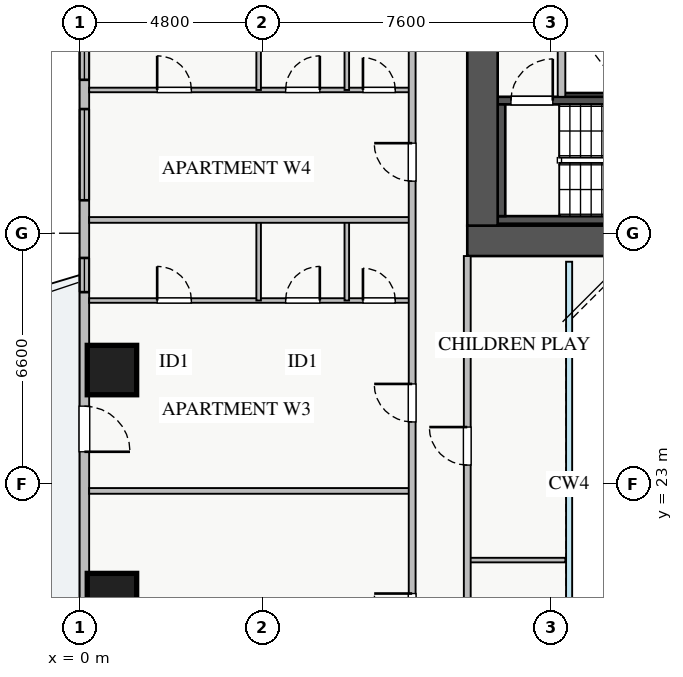
"""IFC4 building model, lengths in metres.
Left out: names, types, materials, properties, quantities, classifications, styles, units other than length and angle.
Written with IfcOpenShell. Run it as: python <this file> out.ifc"""

import sys

from ifc_helpers import new_model, si_unit, direction, frame, frame_2d, origin, origin_2d, place, context, subcontext, project, spatial, rectangle, extrude, source, transform, mapped, element, fill, save


model = new_model("IFC4")
c1 = context("Model", 3, precision=1e-05, world=origin(), true_north=direction((0.0, 1.0)))
c2 = subcontext(c1, "Body", "Model", "MODEL_VIEW")
j1 = project(units=[si_unit("LENGTHUNIT", "METRE"), si_unit("PLANEANGLEUNIT", "RADIAN")], contexts=[c1])
p1 = place(None, origin())
s1 = spatial("IfcSite", under=j1, at=p1, CompositionType="ELEMENT")
p2 = place(p1, origin())
s2 = spatial("IfcBuilding", under=s1, at=p2, CompositionType="ELEMENT")
p3 = place(p2, frame((0.0, 0.0, 66.5)))
s3 = spatial("IfcBuildingStorey", under=s2, at=p3, CompositionType="ELEMENT", Elevation=66.5)
p4 = place(p3, frame((12.68, 33.2, 0.0), z_axis=(0.0, 0.0, 1.0), x_axis=(1.0, 0.0, 0.0)))
e1 = element("IfcWall", 1, at=p4, inside=s3, PredefinedType="SHEAR", context=c2, shape_type="SweptSolid", body=[
    extrude(rectangle(XDim=1.94, YDim=0.18, at=frame_2d((0.97, 0.0))), origin(), (0.0, 0.0, 1.0), 3.07),
])
p5 = place(p3, frame((11.0, 29.95, 0.0), z_axis=(0.0, 0.0, 1.0), x_axis=(1.0, 0.0, 0.0)))
e2 = element("IfcWall", 2, at=p5, inside=s3, PredefinedType="SHEAR", context=c2, shape_type="SweptSolid", body=[
    extrude(rectangle(XDim=7.15, YDim=0.2, at=frame_2d((3.575, 0.0))), origin(), (0.0, 0.0, 1.0), 3.25),
])
p6 = place(p3, frame((11.0, 33.09, 0.0), z_axis=(0.0, 0.0, 1.0), x_axis=(1.0, 0.0, 0.0)))
e3 = element("IfcWall", 3, at=p6, inside=s3, PredefinedType="SHEAR", context=c2, shape_type="SweptSolid", body=[
    extrude(rectangle(XDim=7.15, YDim=0.2, at=frame_2d((3.575, 0.0))), origin(), (0.0, 0.0, 1.0), 3.25),
])
p7 = place(p6, frame((0.35, 0.0, 0.0)))
e4 = element("IfcOpeningElement", 4, at=p7, cuts=e3, PredefinedType="OPENING", context=c2, shape_type="SweptSolid", body=[
    extrude(rectangle(XDim=1.1, YDim=2.05, at=frame_2d((0.55, 1.025))), frame((0.0, 0.11, 0.0), z_axis=(0.0, -1.0, 0.0), x_axis=(1.0, 0.0, 0.0)), (0.0, 0.0, 1.0), 0.22),
])
p8 = place(p3, frame((11.1, 30.05, 0.0), z_axis=(0.0, 0.0, 1.0), x_axis=(0.0, 1.0, 0.0)))
e5 = element("IfcWall", 5, at=p8, inside=s3, PredefinedType="SHEAR", context=c2, shape_type="SweptSolid", body=[
    extrude(rectangle(XDim=2.94, YDim=0.2, at=frame_2d((1.47, 0.0))), origin(), (0.0, 0.0, 1.0), 3.25),
])
p9 = place(p3, frame((10.2, 29.4, 0.0), z_axis=(0.0, 0.0, 1.0), x_axis=(1.0, 0.0, 0.0)))
e6 = element("IfcWall", 6, at=p9, inside=s3, PredefinedType="SHEAR", context=c2, shape_type="SweptSolid", body=[
    extrude(rectangle(XDim=17.6, YDim=0.8, at=frame_2d((8.8, 0.0))), origin(), (0.0, 0.0, 1.0), 3.25),
])
p10 = place(p3, frame((10.6, 29.8, 0.0), z_axis=(0.0, 0.0, 1.0), x_axis=(0.0, 1.0, 0.0)))
e7 = element("IfcWall", 7, at=p10, inside=s3, PredefinedType="SHEAR", context=c2, shape_type="SweptSolid", body=[
    extrude(rectangle(XDim=5.6, YDim=0.8, at=frame_2d((2.8, 0.0))), origin(), (0.0, 0.0, 1.0), 3.25),
])
m1 = source(origin(), c2, "Body", "SweptSolid", [
    extrude(rectangle(XDim=1.3, YDim=1.3, at=origin_2d()), origin(), (0.0, 0.0, 1.0), 3.25),
])
for number, where, z_axis, x_axis in (
    (8, (0.85, 26.0, 0.0), (0.0, 0.0, 1.0), (1.0, 0.0, 0.0)),
    (9, (0.85, 20.0, 0.0), (0.0, 0.0, 1.0), (1.0, 0.0, 0.0)),
):
    element("IfcColumn", number, at=place(p3, frame(where, z_axis=z_axis, x_axis=x_axis)), inside=s3, PredefinedType="COLUMN", context=c2, shape_type="MappedRepresentation", body=[
        mapped(m1, transform((0.0, 0.0, 0.0), x_axis=(1.0, 0.0, 0.0), y_axis=(0.0, 1.0, 0.0), z_axis=(0.0, 0.0, 1.0), scale=1.0)),
    ])
p11 = place(p3, frame((0.125, 9.45, 0.0), z_axis=(0.0, 0.0, 1.0), x_axis=(0.0, 1.0, 0.0)))
e10 = element("IfcWall", 10, at=p11, inside=s3, PredefinedType="STANDARD", context=c2, shape_type="SweptSolid", body=[
    extrude(rectangle(XDim=27.1, YDim=0.25, at=frame_2d((13.55, 0.0))), origin(), (0.0, 0.0, 1.0), 2.61),
])
p12 = place(p11, frame((14.4, 0.0, 0.0)))
e11 = element("IfcOpeningElement", 11, at=p12, cuts=e10, PredefinedType="OPENING", context=c2, shape_type="SweptSolid", body=[
    extrude(rectangle(XDim=1.2, YDim=2.1, at=frame_2d((0.6, 1.05))), frame((0.0, 0.135, 0.0), z_axis=(0.0, -1.0, 0.0), x_axis=(1.0, 0.0, 0.0)), (0.0, 0.0, 1.0), 0.27),
])
p13 = place(p11, frame((1.417, 0.0, 0.9)))
e12 = element("IfcOpeningElement", 12, at=p13, cuts=e10, PredefinedType="OPENING", context=c2, shape_type="SweptSolid", body=[
    extrude(rectangle(XDim=1.2, YDim=1.4, at=frame_2d((0.6, 0.7))), frame((0.0, 0.135, 0.0), z_axis=(0.0, -1.0, 0.0), x_axis=(1.0, 0.0, 0.0)), (0.0, 0.0, 1.0), 0.27),
])
p14 = place(p11, frame((24.188, 0.0, 0.9)))
e13 = element("IfcOpeningElement", 13, at=p14, cuts=e10, PredefinedType="OPENING", context=c2, shape_type="SweptSolid", body=[
    extrude(rectangle(XDim=1.5, YDim=1.5, at=frame_2d((0.75, 0.75))), frame((0.0, 0.135, 0.0), z_axis=(0.0, -1.0, 0.0), x_axis=(1.0, 0.0, 0.0)), (0.0, 0.0, 1.0), 0.27),
])
p15 = place(p11, frame((3.722, 0.0, 0.9)))
e14 = element("IfcOpeningElement", 14, at=p15, cuts=e10, PredefinedType="OPENING", context=c2, shape_type="SweptSolid", body=[
    extrude(rectangle(XDim=2.4, YDim=1.5, at=frame_2d((1.2, 0.75))), frame((0.0, 0.135, 0.0), z_axis=(0.0, -1.0, 0.0), x_axis=(1.0, 0.0, 0.0)), (0.0, 0.0, 1.0), 0.27),
])
p16 = place(p11, frame((21.018, 0.0, 0.9)))
e15 = element("IfcOpeningElement", 15, at=p16, cuts=e10, PredefinedType="OPENING", context=c2, shape_type="SweptSolid", body=[
    extrude(rectangle(XDim=2.4, YDim=1.5, at=frame_2d((1.2, 0.75))), frame((0.0, 0.135, 0.0), z_axis=(0.0, -1.0, 0.0), x_axis=(1.0, 0.0, 0.0)), (0.0, 0.0, 1.0), 0.27),
])
p17 = place(p11, frame((18.6, 0.0, 0.9)))
e16 = element("IfcOpeningElement", 16, at=p17, cuts=e10, PredefinedType="OPENING", context=c2, shape_type="SweptSolid", body=[
    extrude(rectangle(XDim=0.9, YDim=1.2, at=frame_2d((0.45, 0.6))), frame((0.0, 0.135, 0.0), z_axis=(0.0, -1.0, 0.0), x_axis=(1.0, 0.0, 0.0)), (0.0, 0.0, 1.0), 0.27),
])
p18 = place(p3, frame((12.68, 33.19, 0.0), z_axis=(0.0, 0.0, 1.0), x_axis=(0.0, 1.0, 0.0)))
e17 = element("IfcWall", 17, at=p18, inside=s3, PredefinedType="PARTITIONING", context=c2, shape_type="SweptSolid", body=[
    extrude(rectangle(XDim=2.21, YDim=0.2, at=frame_2d((1.105, 0.0))), origin(), (0.0, 0.0, 1.0), 3.07),
])
p19 = place(p3, frame((0.25, 27.83, 0.0), z_axis=(0.0, 0.0, 1.0), x_axis=(1.0, 0.0, 0.0)))
e18 = element("IfcWall", 18, at=p19, inside=s3, PredefinedType="PLUMBINGWALL", context=c2, shape_type="SweptSolid", body=[
    extrude(rectangle(XDim=8.5, YDim=0.12, at=frame_2d((4.25, 0.0))), origin(), (0.0, 0.0, 1.0), 2.815),
])
p20 = place(p19, frame((1.79, 0.0, 0.0)))
e19 = element("IfcOpeningElement", 19, at=p20, cuts=e18, PredefinedType="OPENING", context=c2, shape_type="SweptSolid", body=[
    extrude(rectangle(XDim=0.9, YDim=2.05, at=frame_2d((0.45, 1.025))), frame((0.0, 0.07, 0.0), z_axis=(0.0, -1.0, 0.0), x_axis=(1.0, 0.0, 0.0)), (0.0, 0.0, 1.0), 0.14),
])
p21 = place(p19, frame((5.17, 0.0, 0.0)))
e20 = element("IfcOpeningElement", 20, at=p21, cuts=e18, PredefinedType="OPENING", context=c2, shape_type="SweptSolid", body=[
    extrude(rectangle(XDim=0.9, YDim=2.05, at=frame_2d((0.45, 1.025))), frame((0.0, 0.07, 0.0), z_axis=(0.0, -1.0, 0.0), x_axis=(1.0, 0.0, 0.0)), (0.0, 0.0, 1.0), 0.14),
])
p22 = place(p19, frame((7.205, 0.0, 0.0)))
e21 = element("IfcOpeningElement", 21, at=p22, cuts=e18, PredefinedType="OPENING", context=c2, shape_type="SweptSolid", body=[
    extrude(rectangle(XDim=0.85, YDim=2.05, at=frame_2d((0.425, 1.025))), frame((0.0, 0.07, 0.0), z_axis=(0.0, -1.0, 0.0), x_axis=(1.0, 0.0, 0.0)), (0.0, 0.0, 1.0), 0.14),
])
for number, where, z_axis, x_axis in (
    (22, (4.71, 27.83, 0.0), (0.0, 0.0, 1.0), (0.0, 1.0, 0.0)),
    (23, (7.03, 27.83, 0.0), (0.0, 0.0, 1.0), (0.0, 1.0, 0.0)),
):
    element("IfcWall", number, at=place(p3, frame(where, z_axis=z_axis, x_axis=x_axis)), inside=s3, PredefinedType="PLUMBINGWALL", context=c2, shape_type="SweptSolid", body=[
        extrude(rectangle(XDim=2.12, YDim=0.12, at=frame_2d((1.06, 0.0))), origin(), (0.0, 0.0, 1.0), 3.07),
    ])
p23 = place(p3, frame((0.25, 22.82, 0.0), z_axis=(0.0, 0.0, 1.0), x_axis=(1.0, 0.0, 0.0)))
e24 = element("IfcWall", 24, at=p23, inside=s3, PredefinedType="PARTITIONING", context=c2, shape_type="SweptSolid", body=[
    extrude(rectangle(XDim=8.5, YDim=0.15, at=frame_2d((4.25, 0.0))), origin(), (0.0, 0.0, 1.0), 3.07),
])
p24 = place(p3, frame((0.25, 33.37, 0.0), z_axis=(0.0, 0.0, 1.0), x_axis=(1.0, 0.0, 0.0)))
e25 = element("IfcWall", 25, at=p24, inside=s3, PredefinedType="PLUMBINGWALL", context=c2, shape_type="SweptSolid", body=[
    extrude(rectangle(XDim=8.5, YDim=0.12, at=frame_2d((4.25, 0.0))), origin(), (0.0, 0.0, 1.0), 3.07),
])
p25 = place(p24, frame((1.79, 0.0, 0.0)))
e26 = element("IfcOpeningElement", 26, at=p25, cuts=e25, PredefinedType="OPENING", context=c2, shape_type="SweptSolid", body=[
    extrude(rectangle(XDim=0.9, YDim=2.05, at=frame_2d((0.45, 1.025))), frame((0.0, 0.07, 0.0), z_axis=(0.0, -1.0, 0.0), x_axis=(1.0, 0.0, 0.0)), (0.0, 0.0, 1.0), 0.14),
])
p26 = place(p24, frame((5.17, 0.0, 0.0)))
e27 = element("IfcOpeningElement", 27, at=p26, cuts=e25, PredefinedType="OPENING", context=c2, shape_type="SweptSolid", body=[
    extrude(rectangle(XDim=0.9, YDim=2.05, at=frame_2d((0.45, 1.025))), frame((0.0, 0.07, 0.0), z_axis=(0.0, -1.0, 0.0), x_axis=(1.0, 0.0, 0.0)), (0.0, 0.0, 1.0), 0.14),
])
p27 = place(p24, frame((7.205, 0.0, 0.0)))
e28 = element("IfcOpeningElement", 28, at=p27, cuts=e25, PredefinedType="OPENING", context=c2, shape_type="SweptSolid", body=[
    extrude(rectangle(XDim=0.85, YDim=2.05, at=frame_2d((0.425, 1.025))), frame((0.0, 0.07, 0.0), z_axis=(0.0, -1.0, 0.0), x_axis=(1.0, 0.0, 0.0)), (0.0, 0.0, 1.0), 0.14),
])
for number, where, z_axis, x_axis in (
    (29, (4.71, 33.37, 0.0), (0.0, 0.0, 1.0), (0.0, 1.0, 0.0)),
    (30, (7.03, 33.37, 0.0), (0.0, 0.0, 1.0), (0.0, 1.0, 0.0)),
):
    element("IfcWall", number, at=place(p3, frame(where, z_axis=z_axis, x_axis=x_axis)), inside=s3, PredefinedType="PLUMBINGWALL", context=c2, shape_type="SweptSolid", body=[
        extrude(rectangle(XDim=3.71, YDim=0.12, at=frame_2d((1.855, 0.0))), origin(), (0.0, 0.0, 1.0), 3.07),
    ])
p28 = place(p3, frame((0.25, 29.95, 0.0), z_axis=(0.0, 0.0, 1.0), x_axis=(1.0, 0.0, 0.0)))
e31 = element("IfcWall", 31, at=p28, inside=s3, PredefinedType="PARTITIONING", context=c2, shape_type="SweptSolid", body=[
    extrude(rectangle(XDim=8.5, YDim=0.15, at=frame_2d((4.25, 0.0))), origin(), (0.0, 0.0, 1.0), 3.07),
])
p29 = place(p3, frame((8.75, 7.21, 0.0), z_axis=(0.0, 0.0, 1.0), x_axis=(0.0, 1.0, 0.0)))
e32 = element("IfcWall", 32, at=p29, inside=s3, PredefinedType="PARTITIONING", context=c2, shape_type="SweptSolid", body=[
    extrude(rectangle(XDim=31.23, YDim=0.18, at=frame_2d((15.615, 0.0))), origin(), (0.0, 0.0, 1.0), 3.07),
])
p30 = place(p29, frame((30.09, 0.0, 0.0)))
e33 = element("IfcOpeningElement", 33, at=p30, cuts=e32, PredefinedType="OPENING", context=c2, shape_type="SweptSolid", body=[
    extrude(rectangle(XDim=0.9, YDim=2.05, at=frame_2d((0.45, 1.025))), frame((0.0, 0.1, 0.0), z_axis=(0.0, -1.0, 0.0), x_axis=(1.0, 0.0, 0.0)), (0.0, 0.0, 1.0), 0.2),
])
p31 = place(p29, frame((0.24, 0.0, 0.0)))
e34 = element("IfcOpeningElement", 34, at=p31, cuts=e32, PredefinedType="OPENING", context=c2, shape_type="SweptSolid", body=[
    extrude(rectangle(XDim=0.9, YDim=2.05, at=frame_2d((0.45, 1.025))), frame((0.0, 0.1, 0.0), z_axis=(0.0, -1.0, 0.0), x_axis=(1.0, 0.0, 0.0)), (0.0, 0.0, 1.0), 0.2),
])
p32 = place(p29, frame((2.555, 0.0, 0.0)))
e35 = element("IfcOpeningElement", 35, at=p32, cuts=e32, PredefinedType="OPENING", context=c2, shape_type="SweptSolid", body=[
    extrude(rectangle(XDim=1.0, YDim=2.05, at=frame_2d((0.5, 1.025))), frame((0.0, 0.1, 0.0), z_axis=(0.0, -1.0, 0.0), x_axis=(1.0, 0.0, 0.0)), (0.0, 0.0, 1.0), 0.2),
])
p33 = place(p29, frame((11.91, 0.0, 0.0)))
e36 = element("IfcOpeningElement", 36, at=p33, cuts=e32, PredefinedType="OPENING", context=c2, shape_type="SweptSolid", body=[
    extrude(rectangle(XDim=1.0, YDim=2.05, at=frame_2d((0.5, 1.025))), frame((0.0, 0.1, 0.0), z_axis=(0.0, -1.0, 0.0), x_axis=(1.0, 0.0, 0.0)), (0.0, 0.0, 1.0), 0.2),
])
p34 = place(p29, frame((17.425, 0.0, 0.0)))
e37 = element("IfcOpeningElement", 37, at=p34, cuts=e32, PredefinedType="OPENING", context=c2, shape_type="SweptSolid", body=[
    extrude(rectangle(XDim=1.0, YDim=2.05, at=frame_2d((0.5, 1.025))), frame((0.0, 0.1, 0.0), z_axis=(0.0, -1.0, 0.0), x_axis=(1.0, 0.0, 0.0)), (0.0, 0.0, 1.0), 0.2),
])
p35 = place(p29, frame((23.76, 0.0, 0.0)))
e38 = element("IfcOpeningElement", 38, at=p35, cuts=e32, PredefinedType="OPENING", context=c2, shape_type="SweptSolid", body=[
    extrude(rectangle(XDim=1.0, YDim=2.05, at=frame_2d((0.5, 1.025))), frame((0.0, 0.1, 0.0), z_axis=(0.0, -1.0, 0.0), x_axis=(1.0, 0.0, 0.0)), (0.0, 0.0, 1.0), 0.2),
])
p36 = place(p3, frame((10.2, 21.0, 0.0), z_axis=(0.0, 0.0, 1.0), x_axis=(1.0, 0.0, 0.0)))
e39 = element("IfcWall", 39, at=p36, inside=s3, PredefinedType="PLUMBINGWALL", context=c2, shape_type="SweptSolid", body=[
    extrude(rectangle(XDim=2.58, YDim=0.12, at=frame_2d((1.29, 0.0))), origin(), (0.0, 0.0, 1.0), 3.07),
])
p37 = place(p3, frame((10.2, 17.0, 0.0), z_axis=(0.0, 0.0, 1.0), x_axis=(0.0, 1.0, 0.0)))
e40 = element("IfcWall", 40, at=p37, inside=s3, PredefinedType="PARTITIONING", context=c2, shape_type="SweptSolid", body=[
    extrude(rectangle(XDim=12.0, YDim=0.18, at=frame_2d((6.0, 0.0))), origin(), (0.0, 0.0, 1.0), 3.07),
])
p38 = place(p37, frame((1.5, 0.0, 0.0)))
e41 = element("IfcOpeningElement", 41, at=p38, cuts=e40, PredefinedType="OPENING", context=c2, shape_type="SweptSolid", body=[
    extrude(rectangle(XDim=0.85, YDim=2.05, at=frame_2d((0.425, 1.025))), frame((0.0, 0.1, 0.0), z_axis=(0.0, -1.0, 0.0), x_axis=(1.0, 0.0, 0.0)), (0.0, 0.0, 1.0), 0.2),
])
p39 = place(p37, frame((6.5, 0.0, 0.0)))
e42 = element("IfcOpeningElement", 42, at=p39, cuts=e40, PredefinedType="OPENING", context=c2, shape_type="SweptSolid", body=[
    extrude(rectangle(XDim=1.0, YDim=2.05, at=frame_2d((0.5, 1.025))), frame((0.0, 0.1, 0.0), z_axis=(0.0, -1.0, 0.0), x_axis=(1.0, 0.0, 0.0)), (0.0, 0.0, 1.0), 0.2),
])
m2 = source(origin(), c2, "Body", "SweptSolid", [
    extrude(rectangle(XDim=1.2, YDim=2.1, at=frame_2d((0.6, 1.05))), frame((0.0, 0.025, 0.0), z_axis=(0.0, -1.0, 0.0), x_axis=(1.0, 0.0, 0.0)), (0.0, 0.0, 1.0), 0.05),
])
p40 = place(p12, frame((1.2, 0.0, 0.0), z_axis=(0.0, 0.0, 1.0), x_axis=(-1.0, 0.0, 0.0)))
e43 = element("IfcDoor", 43, at=p40, inside=s3, OperationType="SINGLE_SWING_LEFT", PredefinedType="DOOR", context=c2, shape_type="MappedRepresentation", body=[
    mapped(m2, transform((0.0, 0.0, 0.0), x_axis=(1.0, 0.0, 0.0), y_axis=(0.0, 1.0, 0.0), z_axis=(0.0, 0.0, 1.0), scale=1.0)),
])
fill(e11, e43)
m3 = source(origin(), c2, "Body", "SweptSolid", [
    extrude(rectangle(XDim=1.5, YDim=1.5, at=frame_2d((0.75, 0.75))), frame((0.0, 0.03, 0.0), z_axis=(0.0, -1.0, 0.0), x_axis=(1.0, 0.0, 0.0)), (0.0, 0.0, 1.0), 0.06),
])
p41 = place(p14, origin())
e44 = element("IfcWindow", 44, at=p41, inside=s3, PartitioningType="TRIPLE_PANEL_VERTICAL", PredefinedType="WINDOW", context=c2, shape_type="MappedRepresentation", body=[
    mapped(m3, transform((0.0, 0.0, 0.0), x_axis=(1.0, 0.0, 0.0), y_axis=(0.0, 1.0, 0.0), z_axis=(0.0, 0.0, 1.0), scale=1.0)),
])
fill(e13, e44)
m4 = source(origin(), c2, "Body", "SweptSolid", [
    extrude(rectangle(XDim=1.1, YDim=2.05, at=frame_2d((0.55, 1.025))), frame((0.0, 0.025, 0.0), z_axis=(0.0, -1.0, 0.0), x_axis=(1.0, 0.0, 0.0)), (0.0, 0.0, 1.0), 0.05),
])
p42 = place(p7, origin())
e45 = element("IfcDoor", 45, at=p42, inside=s3, OperationType="SINGLE_SWING_RIGHT", PredefinedType="DOOR", context=c2, shape_type="MappedRepresentation", body=[
    mapped(m4, transform((0.0, 0.0, 0.0), x_axis=(1.0, 0.0, 0.0), y_axis=(0.0, 1.0, 0.0), z_axis=(0.0, 0.0, 1.0), scale=1.0)),
])
fill(e4, e45)
m5 = source(origin(), c2, "Body", "SweptSolid", [
    extrude(rectangle(XDim=0.9, YDim=2.05, at=frame_2d((0.45, 1.025))), frame((0.0, 0.025, 0.0), z_axis=(0.0, -1.0, 0.0), x_axis=(1.0, 0.0, 0.0)), (0.0, 0.0, 1.0), 0.05),
])
p43 = place(p20, origin())
e46 = element("IfcDoor", 46, at=p43, inside=s3, OperationType="SINGLE_SWING_LEFT", PredefinedType="DOOR", context=c2, shape_type="MappedRepresentation", body=[
    mapped(m5, transform((0.0, 0.0, 0.0), x_axis=(1.0, 0.0, 0.0), y_axis=(0.0, 1.0, 0.0), z_axis=(0.0, 0.0, 1.0), scale=1.0)),
])
fill(e19, e46)
p44 = place(p21, origin())
e47 = element("IfcDoor", 47, at=p44, inside=s3, OperationType="SINGLE_SWING_RIGHT", PredefinedType="DOOR", context=c2, shape_type="MappedRepresentation", body=[
    mapped(m5, transform((0.0, 0.0, 0.0), x_axis=(1.0, 0.0, 0.0), y_axis=(0.0, 1.0, 0.0), z_axis=(0.0, 0.0, 1.0), scale=1.0)),
])
fill(e20, e47)
m6 = source(origin(), c2, "Body", "SweptSolid", [
    extrude(rectangle(XDim=0.85, YDim=2.05, at=frame_2d((0.425, 1.025))), frame((0.0, 0.025, 0.0), z_axis=(0.0, -1.0, 0.0), x_axis=(1.0, 0.0, 0.0)), (0.0, 0.0, 1.0), 0.05),
])
p45 = place(p22, origin())
e48 = element("IfcDoor", 48, at=p45, inside=s3, OperationType="SINGLE_SWING_LEFT", PredefinedType="DOOR", context=c2, shape_type="MappedRepresentation", body=[
    mapped(m6, transform((0.0, 0.0, 0.0), x_axis=(1.0, 0.0, 0.0), y_axis=(0.0, 1.0, 0.0), z_axis=(0.0, 0.0, 1.0), scale=1.0)),
])
fill(e21, e48)
p46 = place(p25, origin())
e49 = element("IfcDoor", 49, at=p46, inside=s3, OperationType="SINGLE_SWING_LEFT", PredefinedType="DOOR", context=c2, shape_type="MappedRepresentation", body=[
    mapped(m5, transform((0.0, 0.0, 0.0), x_axis=(1.0, 0.0, 0.0), y_axis=(0.0, 1.0, 0.0), z_axis=(0.0, 0.0, 1.0), scale=1.0)),
])
fill(e26, e49)
p47 = place(p26, origin())
e50 = element("IfcDoor", 50, at=p47, inside=s3, OperationType="SINGLE_SWING_RIGHT", PredefinedType="DOOR", context=c2, shape_type="MappedRepresentation", body=[
    mapped(m5, transform((0.0, 0.0, 0.0), x_axis=(1.0, 0.0, 0.0), y_axis=(0.0, 1.0, 0.0), z_axis=(0.0, 0.0, 1.0), scale=1.0)),
])
fill(e27, e50)
p48 = place(p27, origin())
e51 = element("IfcDoor", 51, at=p48, inside=s3, OperationType="SINGLE_SWING_LEFT", PredefinedType="DOOR", context=c2, shape_type="MappedRepresentation", body=[
    mapped(m6, transform((0.0, 0.0, 0.0), x_axis=(1.0, 0.0, 0.0), y_axis=(0.0, 1.0, 0.0), z_axis=(0.0, 0.0, 1.0), scale=1.0)),
])
fill(e28, e51)
m7 = source(origin(), c2, "Body", "SweptSolid", [
    extrude(rectangle(XDim=1.0, YDim=2.05, at=frame_2d((0.5, 1.025))), frame((0.0, 0.025, 0.0), z_axis=(0.0, -1.0, 0.0), x_axis=(1.0, 0.0, 0.0)), (0.0, 0.0, 1.0), 0.05),
])
p49 = place(p33, origin())
e52 = element("IfcDoor", 52, at=p49, inside=s3, OperationType="SINGLE_SWING_RIGHT", PredefinedType="DOOR", context=c2, shape_type="MappedRepresentation", body=[
    mapped(m7, transform((0.0, 0.0, 0.0), x_axis=(1.0, 0.0, 0.0), y_axis=(0.0, 1.0, 0.0), z_axis=(0.0, 0.0, 1.0), scale=1.0)),
])
fill(e36, e52)
p50 = place(p34, origin())
e53 = element("IfcDoor", 53, at=p50, inside=s3, OperationType="SINGLE_SWING_RIGHT", PredefinedType="DOOR", context=c2, shape_type="MappedRepresentation", body=[
    mapped(m7, transform((0.0, 0.0, 0.0), x_axis=(1.0, 0.0, 0.0), y_axis=(0.0, 1.0, 0.0), z_axis=(0.0, 0.0, 1.0), scale=1.0)),
])
fill(e37, e53)
p51 = place(p35, origin())
e54 = element("IfcDoor", 54, at=p51, inside=s3, OperationType="SINGLE_SWING_RIGHT", PredefinedType="DOOR", context=c2, shape_type="MappedRepresentation", body=[
    mapped(m7, transform((0.0, 0.0, 0.0), x_axis=(1.0, 0.0, 0.0), y_axis=(0.0, 1.0, 0.0), z_axis=(0.0, 0.0, 1.0), scale=1.0)),
])
fill(e38, e54)
p52 = place(p39, origin())
e55 = element("IfcDoor", 55, at=p52, inside=s3, OperationType="SINGLE_SWING_RIGHT", PredefinedType="DOOR", context=c2, shape_type="MappedRepresentation", body=[
    mapped(m7, transform((0.0, 0.0, 0.0), x_axis=(1.0, 0.0, 0.0), y_axis=(0.0, 1.0, 0.0), z_axis=(0.0, 0.0, 1.0), scale=1.0)),
])
fill(e42, e55)
m8 = source(origin(), c2, "Body", "SweptSolid", [
    extrude(rectangle(XDim=2.4, YDim=1.5, at=frame_2d((1.2, 0.75))), frame((0.0, 0.03, 0.0), z_axis=(0.0, -1.0, 0.0), x_axis=(1.0, 0.0, 0.0)), (0.0, 0.0, 1.0), 0.06),
])
p53 = place(p16, origin())
e56 = element("IfcWindow", 56, at=p53, inside=s3, PartitioningType="TRIPLE_PANEL_VERTICAL", PredefinedType="WINDOW", context=c2, shape_type="MappedRepresentation", body=[
    mapped(m8, transform((0.0, 0.0, 0.0), x_axis=(1.0, 0.0, 0.0), y_axis=(0.0, 1.0, 0.0), z_axis=(0.0, 0.0, 1.0), scale=1.0)),
])
fill(e15, e56)
m9 = source(origin(), c2, "Body", "SweptSolid", [
    extrude(rectangle(XDim=0.9, YDim=1.2, at=frame_2d((0.45, 0.6))), frame((0.0, 0.03, 0.0), z_axis=(0.0, -1.0, 0.0), x_axis=(1.0, 0.0, 0.0)), (0.0, 0.0, 1.0), 0.06),
])
p54 = place(p17, origin())
e57 = element("IfcWindow", 57, at=p54, inside=s3, PartitioningType="SINGLE_PANEL", PredefinedType="WINDOW", context=c2, shape_type="MappedRepresentation", body=[
    mapped(m9, transform((0.0, 0.0, 0.0), x_axis=(1.0, 0.0, 0.0), y_axis=(0.0, 1.0, 0.0), z_axis=(0.0, 0.0, 1.0), scale=1.0)),
])
fill(e16, e57)
save(model, sys.argv[1])
